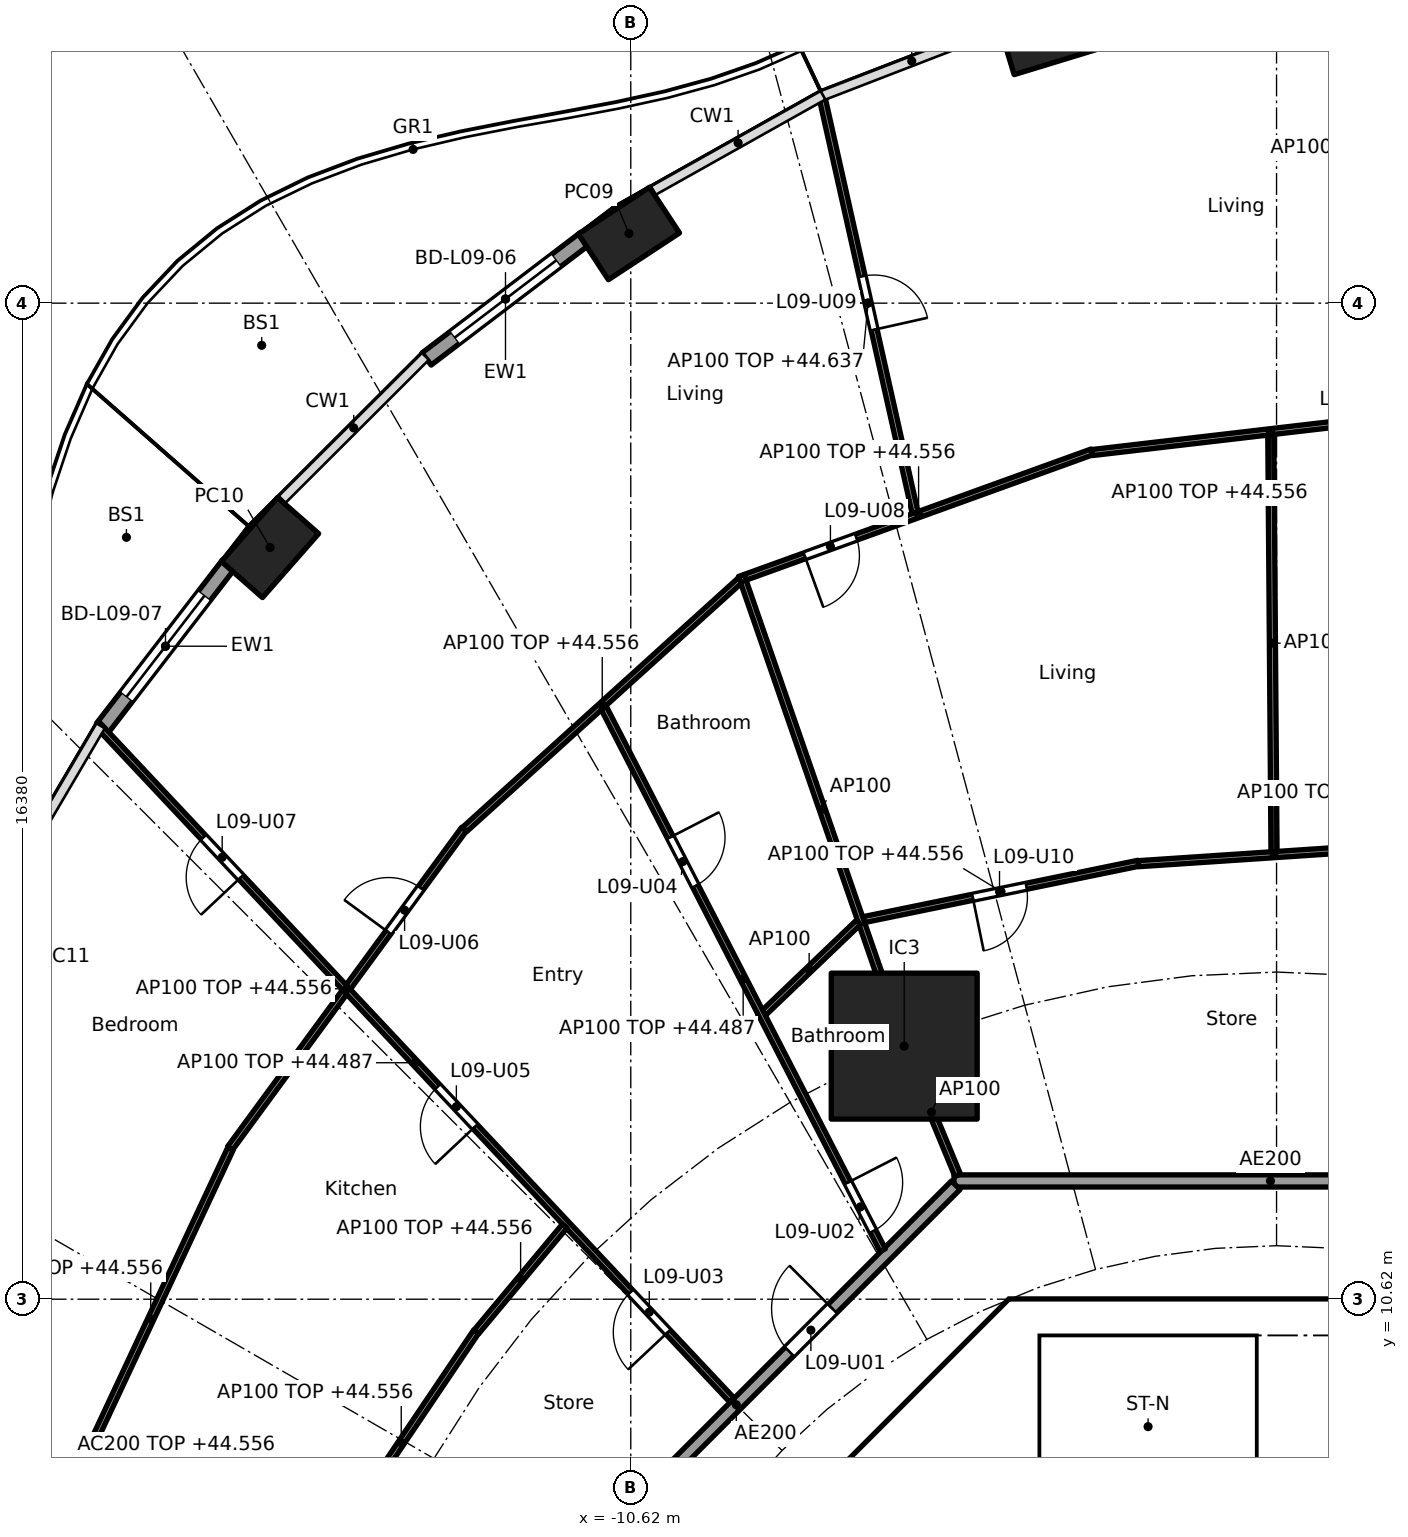
"""IFC4 building model, lengths in metres.
Left out: names, types, materials, properties, quantities, classifications, styles, units other than length and angle.
Written with IfcOpenShell. Run it as: python <this file> out.ifc"""

import sys

from ifc_helpers import new_model, si_unit, direction, frame, frame_2d, origin, origin_2d, place, context, subcontext, project, spatial, polyline, rectangle, hollow_rectangle, outline, extrude, element, fill, save


model = new_model("IFC4")
c1 = context("Model", 3, precision=1e-05, world=origin(), true_north=direction((0.0, 1.0)))
c2 = subcontext(c1, "Body", "Model", "MODEL_VIEW")
j1 = project(units=[si_unit("LENGTHUNIT", "METRE"), si_unit("PLANEANGLEUNIT", "RADIAN")], contexts=[c1])
p1 = place(None, origin())
s1 = spatial("IfcSite", under=j1, at=p1, CompositionType="ELEMENT")
p2 = place(p1, origin())
s2 = spatial("IfcBuilding", under=s1, at=p2, CompositionType="ELEMENT")
p3 = place(p2, frame((0.0, 0.0, 41.8)))
s3 = spatial("IfcBuildingStorey", under=s2, at=p3, CompositionType="ELEMENT", Elevation=41.8)
for number, where, z_axis, x_axis in (
    (1, (-3.776, 31.393, 0.0), (0.0, 0.0, 1.0), (-0.957, -0.292, 0.0)),
    (2, (-10.65, 28.146, 0.0), (0.0, 0.0, 1.0), (-0.836, -0.549, 0.0)),
    (3, (-16.552, 22.981, 0.0), (0.0, 0.0, 1.0), (-0.66, -0.751, 0.0)),
):
    element("IfcColumn", number, at=place(p3, frame(where, z_axis=z_axis, x_axis=x_axis)), inside=s3, PredefinedType="COLUMN", context=c2, shape_type="SweptSolid", body=[
        extrude(hollow_rectangle(XDim=1.4, YDim=0.9, WallThickness=0.05, at=origin_2d()), origin(), (0.0, 0.0, 1.0), 3.7),
    ])
p4 = place(p3, frame((-6.123, 14.782, 0.0), z_axis=(0.0, 0.0, 1.0), x_axis=(1.0, 0.0, 0.0)))
e4 = element("IfcColumn", 4, at=p4, inside=s3, PredefinedType="COLUMN", context=c2, shape_type="SweptSolid", body=[
    extrude(rectangle(XDim=2.4, YDim=2.4, at=origin_2d()), origin(), (0.0, 0.0, 1.0), 3.7),
])
p5 = place(p3, frame((-13.979, 26.081, 0.0), z_axis=(0.0, 0.0, 1.0), x_axis=(0.796022293214, 0.605267303517, 0.0)))
e5 = element("IfcWall", 5, at=p5, inside=s3, PredefinedType="SOLIDWALL", context=c2, shape_type="SweptSolid", body=[
    extrude(rectangle(XDim=3.262, YDim=0.25, at=frame_2d((1.631, 0.0))), origin(), (0.0, 0.0, 1.0), 3.44),
])
p6 = place(p5, frame((0.581, 0.0, 0.0)))
e6 = element("IfcOpeningElement", 6, at=p6, cuts=e5, PredefinedType="OPENING", context=c2, shape_type="SweptSolid", body=[
    extrude(rectangle(XDim=2.1, YDim=2.4, at=frame_2d((1.05, 1.2))), frame((0.0, 0.135, 0.0), z_axis=(0.0, -1.0, 0.0), x_axis=(1.0, 0.0, 0.0)), (0.0, 0.0, 1.0), 0.27),
])
p7 = place(p3, frame((-19.308, 20.013, 0.0), z_axis=(0.0, 0.0, 1.0), x_axis=(0.610457147657, 0.792049285635, 0.0)))
e7 = element("IfcWall", 7, at=p7, inside=s3, PredefinedType="SOLIDWALL", context=c2, shape_type="SweptSolid", body=[
    extrude(rectangle(XDim=3.397, YDim=0.25, at=frame_2d((1.699, 0.0))), origin(), (0.0, 0.0, 1.0), 3.44),
])
p8 = place(p7, frame((0.649, 0.0, 0.0)))
e8 = element("IfcOpeningElement", 8, at=p8, cuts=e7, PredefinedType="OPENING", context=c2, shape_type="SweptSolid", body=[
    extrude(rectangle(XDim=2.1, YDim=2.4, at=frame_2d((1.05, 1.2))), frame((0.0, 0.135, 0.0), z_axis=(0.0, -1.0, 0.0), x_axis=(1.0, 0.0, 0.0)), (0.0, 0.0, 1.0), 0.27),
])
p9 = place(p3, frame((-4.613, 9.988, 0.0), z_axis=(0.0, 0.0, 1.0), x_axis=(-0.707106781187, -0.707106781187, 0.0)))
e9 = element("IfcWall", 9, at=p9, inside=s3, PredefinedType="SHEAR", context=c2, shape_type="SweptSolid", body=[
    extrude(rectangle(XDim=7.602, YDim=0.6, at=frame_2d((3.801, 0.0))), origin(), (0.0, 0.0, 1.0), 3.44),
])
p10 = place(p9, frame((0.351, 0.0, 0.0)))
e10 = element("IfcOpeningElement", 10, at=p10, cuts=e9, PredefinedType="OPENING", context=c2, shape_type="SweptSolid", body=[
    extrude(rectangle(XDim=1.1, YDim=2.1, at=frame_2d((0.55, 1.05))), frame((0.0, 0.31, 0.0), z_axis=(0.0, -1.0, 0.0), x_axis=(1.0, 0.0, 0.0)), (0.0, 0.0, 1.0), 0.62),
])
p11 = place(p3, origin())
e11 = element("IfcWall", 11, at=p11, inside=s3, PredefinedType="SHEAR", context=c2, shape_type="SweptSolid", body=[
    extrude(outline(polyline([(-4.152, 10.025), (-4.401, 9.776), (-4.825, 10.2), (-4.401, 10.625), (4.401, 10.625), (4.825, 10.2), (4.401, 9.776), (4.152, 10.025), (-4.152, 10.025)])), origin(), (0.0, 0.0, 1.0), 3.44),
])
p12 = place(p3, origin())
e12 = element("IfcWall", 12, at=p12, inside=s3, PredefinedType="SOLIDWALL", context=c2, shape_type="SweptSolid", body=[
    extrude(outline(polyline([(-3.9, 7.025), (-4.1, 7.025), (-4.1, 10.025), (-3.9, 10.025), (-3.9, 7.025)])), origin(), (0.0, 0.0, 1.0), 3.44),
])
p13 = place(p3, frame((-14.831, 6.135, 0.0), z_axis=(0.0, 0.0, 1.0), x_axis=(-0.969884949569, 0.243563512454, 0.0)))
e13 = element("IfcWall", 13, at=p13, inside=s3, PredefinedType="PARTITIONING", context=c2, shape_type="SweptSolid", body=[
    extrude(rectangle(XDim=8.829, YDim=0.2, at=frame_2d((4.415, 0.0))), origin(), (0.0, 0.0, 1.0), 2.756),
])
p14 = place(p3, frame((5.104, 12.565, 0.0), z_axis=(0.0, 0.0, 1.0), x_axis=(-1.0, 0.0, 0.0)))
e14 = element("IfcWall", 14, at=p14, inside=s3, PredefinedType="PARTITIONING", context=c2, shape_type="SweptSolid", body=[
    extrude(rectangle(XDim=10.409, YDim=0.2, at=frame_2d((5.205, 0.0))), origin(), (0.0, 0.0, 1.0), 3.44),
])
p15 = place(p3, frame((-5.275, 12.494, 0.0), z_axis=(0.0, 0.0, 1.0), x_axis=(-0.707106781187, -0.707106781187, 0.0)))
e15 = element("IfcWall", 15, at=p15, inside=s3, PredefinedType="PARTITIONING", context=c2, shape_type="SweptSolid", body=[
    extrude(rectangle(XDim=10.209, YDim=0.2, at=frame_2d((5.104, 0.0))), origin(), (0.0, 0.0, 1.0), 3.44),
])
p16 = place(p15, frame((2.87, 0.0, 0.0)))
e16 = element("IfcOpeningElement", 16, at=p16, cuts=e15, PredefinedType="OPENING", context=c2, shape_type="SweptSolid", body=[
    extrude(rectangle(XDim=1.0, YDim=2.1, at=frame_2d((0.5, 1.05))), frame((0.0, 0.11, 0.0), z_axis=(0.0, -1.0, 0.0), x_axis=(1.0, 0.0, 0.0)), (0.0, 0.0, 1.0), 0.22),
])
p17 = place(p3, frame((2.188, 18.079, 0.0), z_axis=(0.0, 0.0, 1.0), x_axis=(-0.997791437766, -0.066424744789, 0.0)))
e17 = element("IfcWall", 17, at=p17, inside=s3, PredefinedType="PARTITIONING", context=c2, shape_type="SweptSolid", body=[
    extrude(rectangle(XDim=4.469, YDim=0.1, at=frame_2d((2.235, 0.0))), origin(), (0.0, 0.0, 1.0), 2.756),
])
p18 = place(p3, frame((2.842, 25.229, 0.0), z_axis=(0.0, 0.0, 1.0), x_axis=(-0.993255612046, -0.115945198862, 0.0)))
e18 = element("IfcWall", 18, at=p18, inside=s3, PredefinedType="PARTITIONING", context=c2, shape_type="SweptSolid", body=[
    extrude(rectangle(XDim=5.913, YDim=0.1, at=frame_2d((2.956, 0.0))), origin(), (0.0, 0.0, 1.0), 2.756),
])
p19 = place(p18, frame((1.028, 0.0, 0.0)))
e19 = element("IfcOpeningElement", 19, at=p19, cuts=e18, PredefinedType="OPENING", context=c2, shape_type="SweptSolid", body=[
    extrude(rectangle(XDim=0.9, YDim=2.1, at=frame_2d((0.45, 1.05))), frame((0.0, 0.06, 0.0), z_axis=(0.0, -1.0, 0.0), x_axis=(1.0, 0.0, 0.0)), (0.0, 0.0, 1.0), 0.12),
])
p20 = place(p3, frame((-0.042, 17.98, 0.0), z_axis=(0.0, 0.0, 1.0), x_axis=(-0.007692080119, 0.999970415514, 0.0)))
e20 = element("IfcWall", 20, at=p20, inside=s3, PredefinedType="PARTITIONING", context=c2, shape_type="SweptSolid", body=[
    extrude(rectangle(XDim=6.856, YDim=0.1, at=frame_2d((3.428, 0.0))), origin(), (0.0, 0.0, 1.0), 3.44),
])
p21 = place(p3, frame((-2.272, 17.789, 0.0), z_axis=(0.0, 0.0, 1.0), x_axis=(-0.979587203416, -0.2010196779, 0.0)))
e21 = element("IfcWall", 21, at=p21, inside=s3, PredefinedType="PARTITIONING", context=c2, shape_type="SweptSolid", body=[
    extrude(rectangle(XDim=4.613, YDim=0.1, at=frame_2d((2.306, 0.0))), origin(), (0.0, 0.0, 1.0), 2.756),
])
p22 = place(p21, frame((1.881, 0.0, 0.0)))
e22 = element("IfcOpeningElement", 22, at=p22, cuts=e21, PredefinedType="OPENING", context=c2, shape_type="SweptSolid", body=[
    extrude(rectangle(XDim=0.9, YDim=2.1, at=frame_2d((0.45, 1.05))), frame((0.0, 0.06, 0.0), z_axis=(0.0, -1.0, 0.0), x_axis=(1.0, 0.0, 0.0)), (0.0, 0.0, 1.0), 0.12),
])
p23 = place(p3, frame((-3.034, 24.554, 0.0), z_axis=(0.0, 0.0, 1.0), x_axis=(-0.940401691072, -0.340065669288, 0.0)))
e23 = element("IfcWall", 23, at=p23, inside=s3, PredefinedType="PARTITIONING", context=c2, shape_type="SweptSolid", body=[
    extrude(rectangle(XDim=6.067, YDim=0.1, at=frame_2d((3.034, 0.0))), origin(), (0.0, 0.0, 1.0), 2.756),
])
p24 = place(p23, frame((4.125, 0.0, 0.0)))
e24 = element("IfcOpeningElement", 24, at=p24, cuts=e23, PredefinedType="OPENING", context=c2, shape_type="SweptSolid", body=[
    extrude(rectangle(XDim=0.9, YDim=2.1, at=frame_2d((0.45, 1.05))), frame((0.0, 0.06, 0.0), z_axis=(0.0, -1.0, 0.0), x_axis=(1.0, 0.0, 0.0)), (0.0, 0.0, 1.0), 0.12),
])
p25 = place(p3, frame((-5.945, 23.555, 0.0), z_axis=(0.0, 0.0, 1.0), x_axis=(-0.218598565433, 0.975814873421, 0.0)))
e25 = element("IfcWall", 25, at=p25, inside=s3, PredefinedType="PARTITIONING", context=c2, shape_type="SweptSolid", body=[
    extrude(rectangle(XDim=7.065, YDim=0.1, at=frame_2d((3.533, 0.0))), origin(), (0.0, 0.0, 1.0), 2.837),
])
p26 = place(p25, frame((3.083, 0.0, 0.0)))
e26 = element("IfcOpeningElement", 26, at=p26, cuts=e25, PredefinedType="OPENING", context=c2, shape_type="SweptSolid", body=[
    extrude(rectangle(XDim=0.9, YDim=2.1, at=frame_2d((0.45, 1.05))), frame((0.0, 0.06, 0.0), z_axis=(0.0, -1.0, 0.0), x_axis=(1.0, 0.0, 0.0)), (0.0, 0.0, 1.0), 0.12),
])
p27 = place(p3, frame((-5.243, 12.657, 0.0), z_axis=(0.0, 0.0, 1.0), x_axis=(-0.382719158442, 0.923864733477, 0.0)))
e27 = element("IfcWall", 27, at=p27, inside=s3, PredefinedType="PARTITIONING", context=c2, shape_type="SweptSolid", body=[
    extrude(rectangle(XDim=2.25, YDim=0.1, at=frame_2d((1.125, 0.0))), origin(), (0.0, 0.0, 1.0), 3.44),
])
p28 = place(p3, frame((-6.139, 14.829, 0.0), z_axis=(0.0, 0.0, 1.0), x_axis=(-0.327183700812, 0.944960753642, 0.0)))
e28 = element("IfcWall", 28, at=p28, inside=s3, PredefinedType="PARTITIONING", context=c2, shape_type="SweptSolid", body=[
    extrude(rectangle(XDim=8.14, YDim=0.1, at=frame_2d((4.07, 0.0))), origin(), (0.0, 0.0, 1.0), 3.44),
])
p29 = place(p3, frame((-6.876, 16.817, 0.0), z_axis=(0.0, 0.0, 1.0), x_axis=(-0.722762371977, -0.691096631199, 0.0)))
e29 = element("IfcWall", 29, at=p29, inside=s3, PredefinedType="PARTITIONING", context=c2, shape_type="SweptSolid", body=[
    extrude(rectangle(XDim=2.244, YDim=0.1, at=frame_2d((1.122, 0.0))), origin(), (0.0, 0.0, 1.0), 3.44),
])
p30 = place(p3, frame((-8.823, 22.441, 0.0), z_axis=(0.0, 0.0, 1.0), x_axis=(-0.741722263338, -0.670707152242, 0.0)))
e30 = element("IfcWall", 30, at=p30, inside=s3, PredefinedType="PARTITIONING", context=c2, shape_type="SweptSolid", body=[
    extrude(rectangle(XDim=6.109, YDim=0.1, at=frame_2d((3.055, 0.0))), origin(), (0.0, 0.0, 1.0), 2.756),
])
p31 = place(p3, frame((-6.477, 11.427, 0.0), z_axis=(0.0, 0.0, 1.0), x_axis=(-0.457464037982, 0.889228122561, 0.0)))
e31 = element("IfcWall", 31, at=p31, inside=s3, PredefinedType="PARTITIONING", context=c2, shape_type="SweptSolid", body=[
    extrude(rectangle(XDim=10.032, YDim=0.1, at=frame_2d((5.016, 0.0))), origin(), (0.0, 0.0, 1.0), 2.687),
])
p32 = place(p31, frame((0.35, 0.0, 0.0)))
e32 = element("IfcOpeningElement", 32, at=p32, cuts=e31, PredefinedType="OPENING", context=c2, shape_type="SweptSolid", body=[
    extrude(rectangle(XDim=0.9, YDim=2.1, at=frame_2d((0.45, 1.05))), frame((0.0, 0.06, 0.0), z_axis=(0.0, -1.0, 0.0), x_axis=(1.0, 0.0, 0.0)), (0.0, 0.0, 1.0), 0.12),
])
p33 = place(p31, frame((6.735, 0.0, 0.0)))
e33 = element("IfcOpeningElement", 33, at=p33, cuts=e31, PredefinedType="OPENING", context=c2, shape_type="SweptSolid", body=[
    extrude(rectangle(XDim=0.9, YDim=2.1, at=frame_2d((0.45, 1.05))), frame((0.0, 0.06, 0.0), z_axis=(0.0, -1.0, 0.0), x_axis=(1.0, 0.0, 0.0)), (0.0, 0.0, 1.0), 0.12),
])
p34 = place(p3, frame((-13.362, 18.35, 0.0), z_axis=(0.0, 0.0, 1.0), x_axis=(-0.591191311491, -0.806531359104, 0.0)))
e34 = element("IfcWall", 34, at=p34, inside=s3, PredefinedType="PARTITIONING", context=c2, shape_type="SweptSolid", body=[
    extrude(rectangle(XDim=6.51, YDim=0.1, at=frame_2d((3.255, 0.0))), origin(), (0.0, 0.0, 1.0), 2.756),
])
p35 = place(p34, frame((1.202, 0.0, 0.0)))
e35 = element("IfcOpeningElement", 35, at=p35, cuts=e34, PredefinedType="OPENING", context=c2, shape_type="SweptSolid", body=[
    extrude(rectangle(XDim=0.9, YDim=2.1, at=frame_2d((0.45, 1.05))), frame((0.0, 0.06, 0.0), z_axis=(0.0, -1.0, 0.0), x_axis=(1.0, 0.0, 0.0)), (0.0, 0.0, 1.0), 0.12),
])
p36 = place(p3, frame((-8.953, 8.958, 0.0), z_axis=(0.0, 0.0, 1.0), x_axis=(-0.684574307023, 0.728943082939, 0.0)))
e36 = element("IfcWall", 36, at=p36, inside=s3, PredefinedType="PARTITIONING", context=c2, shape_type="SweptSolid", body=[
    extrude(rectangle(XDim=15.231, YDim=0.1, at=frame_2d((7.615, 0.0))), origin(), (0.0, 0.0, 1.0), 2.687),
])
p37 = place(p36, frame((1.54, 0.0, 0.0)))
e37 = element("IfcOpeningElement", 37, at=p37, cuts=e36, PredefinedType="OPENING", context=c2, shape_type="SweptSolid", body=[
    extrude(rectangle(XDim=0.9, YDim=2.1, at=frame_2d((0.45, 1.05))), frame((0.0, 0.06, 0.0), z_axis=(0.0, -1.0, 0.0), x_axis=(1.0, 0.0, 0.0)), (0.0, 0.0, 1.0), 0.12),
])
p38 = place(p36, frame((6.174, 0.0, 0.0)))
e38 = element("IfcOpeningElement", 38, at=p38, cuts=e36, PredefinedType="OPENING", context=c2, shape_type="SweptSolid", body=[
    extrude(rectangle(XDim=0.9, YDim=2.1, at=frame_2d((0.45, 1.05))), frame((0.0, 0.06, 0.0), z_axis=(0.0, -1.0, 0.0), x_axis=(1.0, 0.0, 0.0)), (0.0, 0.0, 1.0), 0.12),
])
p39 = place(p36, frame((11.8, 0.0, 0.0)))
e39 = element("IfcOpeningElement", 39, at=p39, cuts=e36, PredefinedType="OPENING", context=c2, shape_type="SweptSolid", body=[
    extrude(rectangle(XDim=0.9, YDim=2.1, at=frame_2d((0.45, 1.05))), frame((0.0, 0.06, 0.0), z_axis=(0.0, -1.0, 0.0), x_axis=(1.0, 0.0, 0.0)), (0.0, 0.0, 1.0), 0.12),
])
p40 = place(p3, frame((-11.705, 11.825, 0.0), z_axis=(0.0, 0.0, 1.0), x_axis=(-0.640861724905, -0.767656335577, 0.0)))
e40 = element("IfcWall", 40, at=p40, inside=s3, PredefinedType="PARTITIONING", context=c2, shape_type="SweptSolid", body=[
    extrude(rectangle(XDim=2.268, YDim=0.1, at=frame_2d((1.134, 0.0))), origin(), (0.0, 0.0, 1.0), 2.756),
])
p41 = place(p3, frame((-13.162, 10.087, 0.0), z_axis=(0.0, 0.0, 1.0), x_axis=(-0.55912750241, -0.829081682375, 0.0)))
e41 = element("IfcWall", 41, at=p41, inside=s3, PredefinedType="PARTITIONING", context=c2, shape_type="SweptSolid", body=[
    extrude(rectangle(XDim=4.408, YDim=0.1, at=frame_2d((2.204, 0.0))), origin(), (0.0, 0.0, 1.0), 2.756),
])
p42 = place(p3, frame((-17.203, 13.095, 0.0), z_axis=(0.0, 0.0, 1.0), x_axis=(-0.423926333401, -0.905696673202, 0.0)))
e42 = element("IfcWall", 42, at=p42, inside=s3, PredefinedType="PARTITIONING", context=c2, shape_type="SweptSolid", body=[
    extrude(rectangle(XDim=6.188, YDim=0.1, at=frame_2d((3.094, 0.0))), origin(), (0.0, 0.0, 1.0), 2.756),
])
p43 = place(p6, origin())
e43 = element("IfcDoor", 43, at=p43, inside=s3, OperationType="SLIDING_TO_LEFT", PredefinedType="DOOR", context=c2, shape_type="SweptSolid", body=[
    extrude(rectangle(XDim=2.1, YDim=2.4, at=frame_2d((1.05, 1.2))), frame((0.0, 0.025, 0.0), z_axis=(0.0, -1.0, 0.0), x_axis=(1.0, 0.0, 0.0)), (0.0, 0.0, 1.0), 0.05),
])
fill(e6, e43)
p44 = place(p8, origin())
e44 = element("IfcDoor", 44, at=p44, inside=s3, OperationType="SLIDING_TO_LEFT", PredefinedType="DOOR", context=c2, shape_type="SweptSolid", body=[
    extrude(rectangle(XDim=2.1, YDim=2.4, at=frame_2d((1.05, 1.2))), frame((0.0, 0.025, 0.0), z_axis=(0.0, -1.0, 0.0), x_axis=(1.0, 0.0, 0.0)), (0.0, 0.0, 1.0), 0.05),
])
fill(e8, e44)
p45 = place(p10, origin())
e45 = element("IfcDoor", 45, at=p45, inside=s3, OperationType="SINGLE_SWING_RIGHT", PredefinedType="DOOR", context=c2, shape_type="SweptSolid", body=[
    extrude(rectangle(XDim=1.1, YDim=2.1, at=frame_2d((0.55, 1.05))), frame((0.0, 0.025, 0.0), z_axis=(0.0, -1.0, 0.0), x_axis=(1.0, 0.0, 0.0)), (0.0, 0.0, 1.0), 0.05),
])
fill(e10, e45)
p46 = place(p16, frame((1.0, 0.0, 0.0), x_axis=(-1.0, 0.0, 0.0)))
e46 = element("IfcDoor", 46, at=p46, inside=s3, OperationType="SINGLE_SWING_RIGHT", PredefinedType="DOOR", context=c2, shape_type="SweptSolid", body=[
    extrude(rectangle(XDim=1.0, YDim=2.1, at=frame_2d((0.5, 1.05))), frame((0.0, 0.025, 0.0), z_axis=(0.0, -1.0, 0.0), x_axis=(1.0, 0.0, 0.0)), (0.0, 0.0, 1.0), 0.05),
])
fill(e16, e46)
p47 = place(p32, frame((0.9, 0.0, 0.0), x_axis=(-1.0, 0.0, 0.0)))
e47 = element("IfcDoor", 47, at=p47, inside=s3, OperationType="SINGLE_SWING_LEFT", PredefinedType="DOOR", context=c2, shape_type="SweptSolid", body=[
    extrude(rectangle(XDim=0.9, YDim=2.1, at=frame_2d((0.45, 1.05))), frame((0.0, 0.025, 0.0), z_axis=(0.0, -1.0, 0.0), x_axis=(1.0, 0.0, 0.0)), (0.0, 0.0, 1.0), 0.05),
])
fill(e32, e47)
p48 = place(p37, origin())
e48 = element("IfcDoor", 48, at=p48, inside=s3, OperationType="SINGLE_SWING_LEFT", PredefinedType="DOOR", context=c2, shape_type="SweptSolid", body=[
    extrude(rectangle(XDim=0.9, YDim=2.1, at=frame_2d((0.45, 1.05))), frame((0.0, 0.025, 0.0), z_axis=(0.0, -1.0, 0.0), x_axis=(1.0, 0.0, 0.0)), (0.0, 0.0, 1.0), 0.05),
])
fill(e37, e48)
p49 = place(p33, frame((0.9, 0.0, 0.0), x_axis=(-1.0, 0.0, 0.0)))
e49 = element("IfcDoor", 49, at=p49, inside=s3, OperationType="SINGLE_SWING_LEFT", PredefinedType="DOOR", context=c2, shape_type="SweptSolid", body=[
    extrude(rectangle(XDim=0.9, YDim=2.1, at=frame_2d((0.45, 1.05))), frame((0.0, 0.025, 0.0), z_axis=(0.0, -1.0, 0.0), x_axis=(1.0, 0.0, 0.0)), (0.0, 0.0, 1.0), 0.05),
])
fill(e33, e49)
p50 = place(p38, origin())
e50 = element("IfcDoor", 50, at=p50, inside=s3, OperationType="SINGLE_SWING_LEFT", PredefinedType="DOOR", context=c2, shape_type="SweptSolid", body=[
    extrude(rectangle(XDim=0.9, YDim=2.1, at=frame_2d((0.45, 1.05))), frame((0.0, 0.025, 0.0), z_axis=(0.0, -1.0, 0.0), x_axis=(1.0, 0.0, 0.0)), (0.0, 0.0, 1.0), 0.05),
])
fill(e38, e50)
p51 = place(p35, frame((0.9, 0.0, 0.0), x_axis=(-1.0, 0.0, 0.0)))
e51 = element("IfcDoor", 51, at=p51, inside=s3, OperationType="SINGLE_SWING_LEFT", PredefinedType="DOOR", context=c2, shape_type="SweptSolid", body=[
    extrude(rectangle(XDim=0.9, YDim=2.1, at=frame_2d((0.45, 1.05))), frame((0.0, 0.025, 0.0), z_axis=(0.0, -1.0, 0.0), x_axis=(1.0, 0.0, 0.0)), (0.0, 0.0, 1.0), 0.05),
])
fill(e35, e51)
p52 = place(p39, origin())
e52 = element("IfcDoor", 52, at=p52, inside=s3, OperationType="SINGLE_SWING_LEFT", PredefinedType="DOOR", context=c2, shape_type="SweptSolid", body=[
    extrude(rectangle(XDim=0.9, YDim=2.1, at=frame_2d((0.45, 1.05))), frame((0.0, 0.025, 0.0), z_axis=(0.0, -1.0, 0.0), x_axis=(1.0, 0.0, 0.0)), (0.0, 0.0, 1.0), 0.05),
])
fill(e39, e52)
p53 = place(p24, origin())
e53 = element("IfcDoor", 53, at=p53, inside=s3, OperationType="SINGLE_SWING_RIGHT", PredefinedType="DOOR", context=c2, shape_type="SweptSolid", body=[
    extrude(rectangle(XDim=0.9, YDim=2.1, at=frame_2d((0.45, 1.05))), frame((0.0, 0.025, 0.0), z_axis=(0.0, -1.0, 0.0), x_axis=(1.0, 0.0, 0.0)), (0.0, 0.0, 1.0), 0.05),
])
fill(e24, e53)
p54 = place(p26, frame((0.9, 0.0, 0.0), x_axis=(-1.0, 0.0, 0.0)))
e54 = element("IfcDoor", 54, at=p54, inside=s3, OperationType="SINGLE_SWING_RIGHT", PredefinedType="DOOR", context=c2, shape_type="SweptSolid", body=[
    extrude(rectangle(XDim=0.9, YDim=2.1, at=frame_2d((0.45, 1.05))), frame((0.0, 0.025, 0.0), z_axis=(0.0, -1.0, 0.0), x_axis=(1.0, 0.0, 0.0)), (0.0, 0.0, 1.0), 0.05),
])
fill(e26, e54)
p55 = place(p22, origin())
e55 = element("IfcDoor", 55, at=p55, inside=s3, OperationType="SINGLE_SWING_RIGHT", PredefinedType="DOOR", context=c2, shape_type="SweptSolid", body=[
    extrude(rectangle(XDim=0.9, YDim=2.1, at=frame_2d((0.45, 1.05))), frame((0.0, 0.025, 0.0), z_axis=(0.0, -1.0, 0.0), x_axis=(1.0, 0.0, 0.0)), (0.0, 0.0, 1.0), 0.05),
])
fill(e22, e55)
save(model, sys.argv[1])
